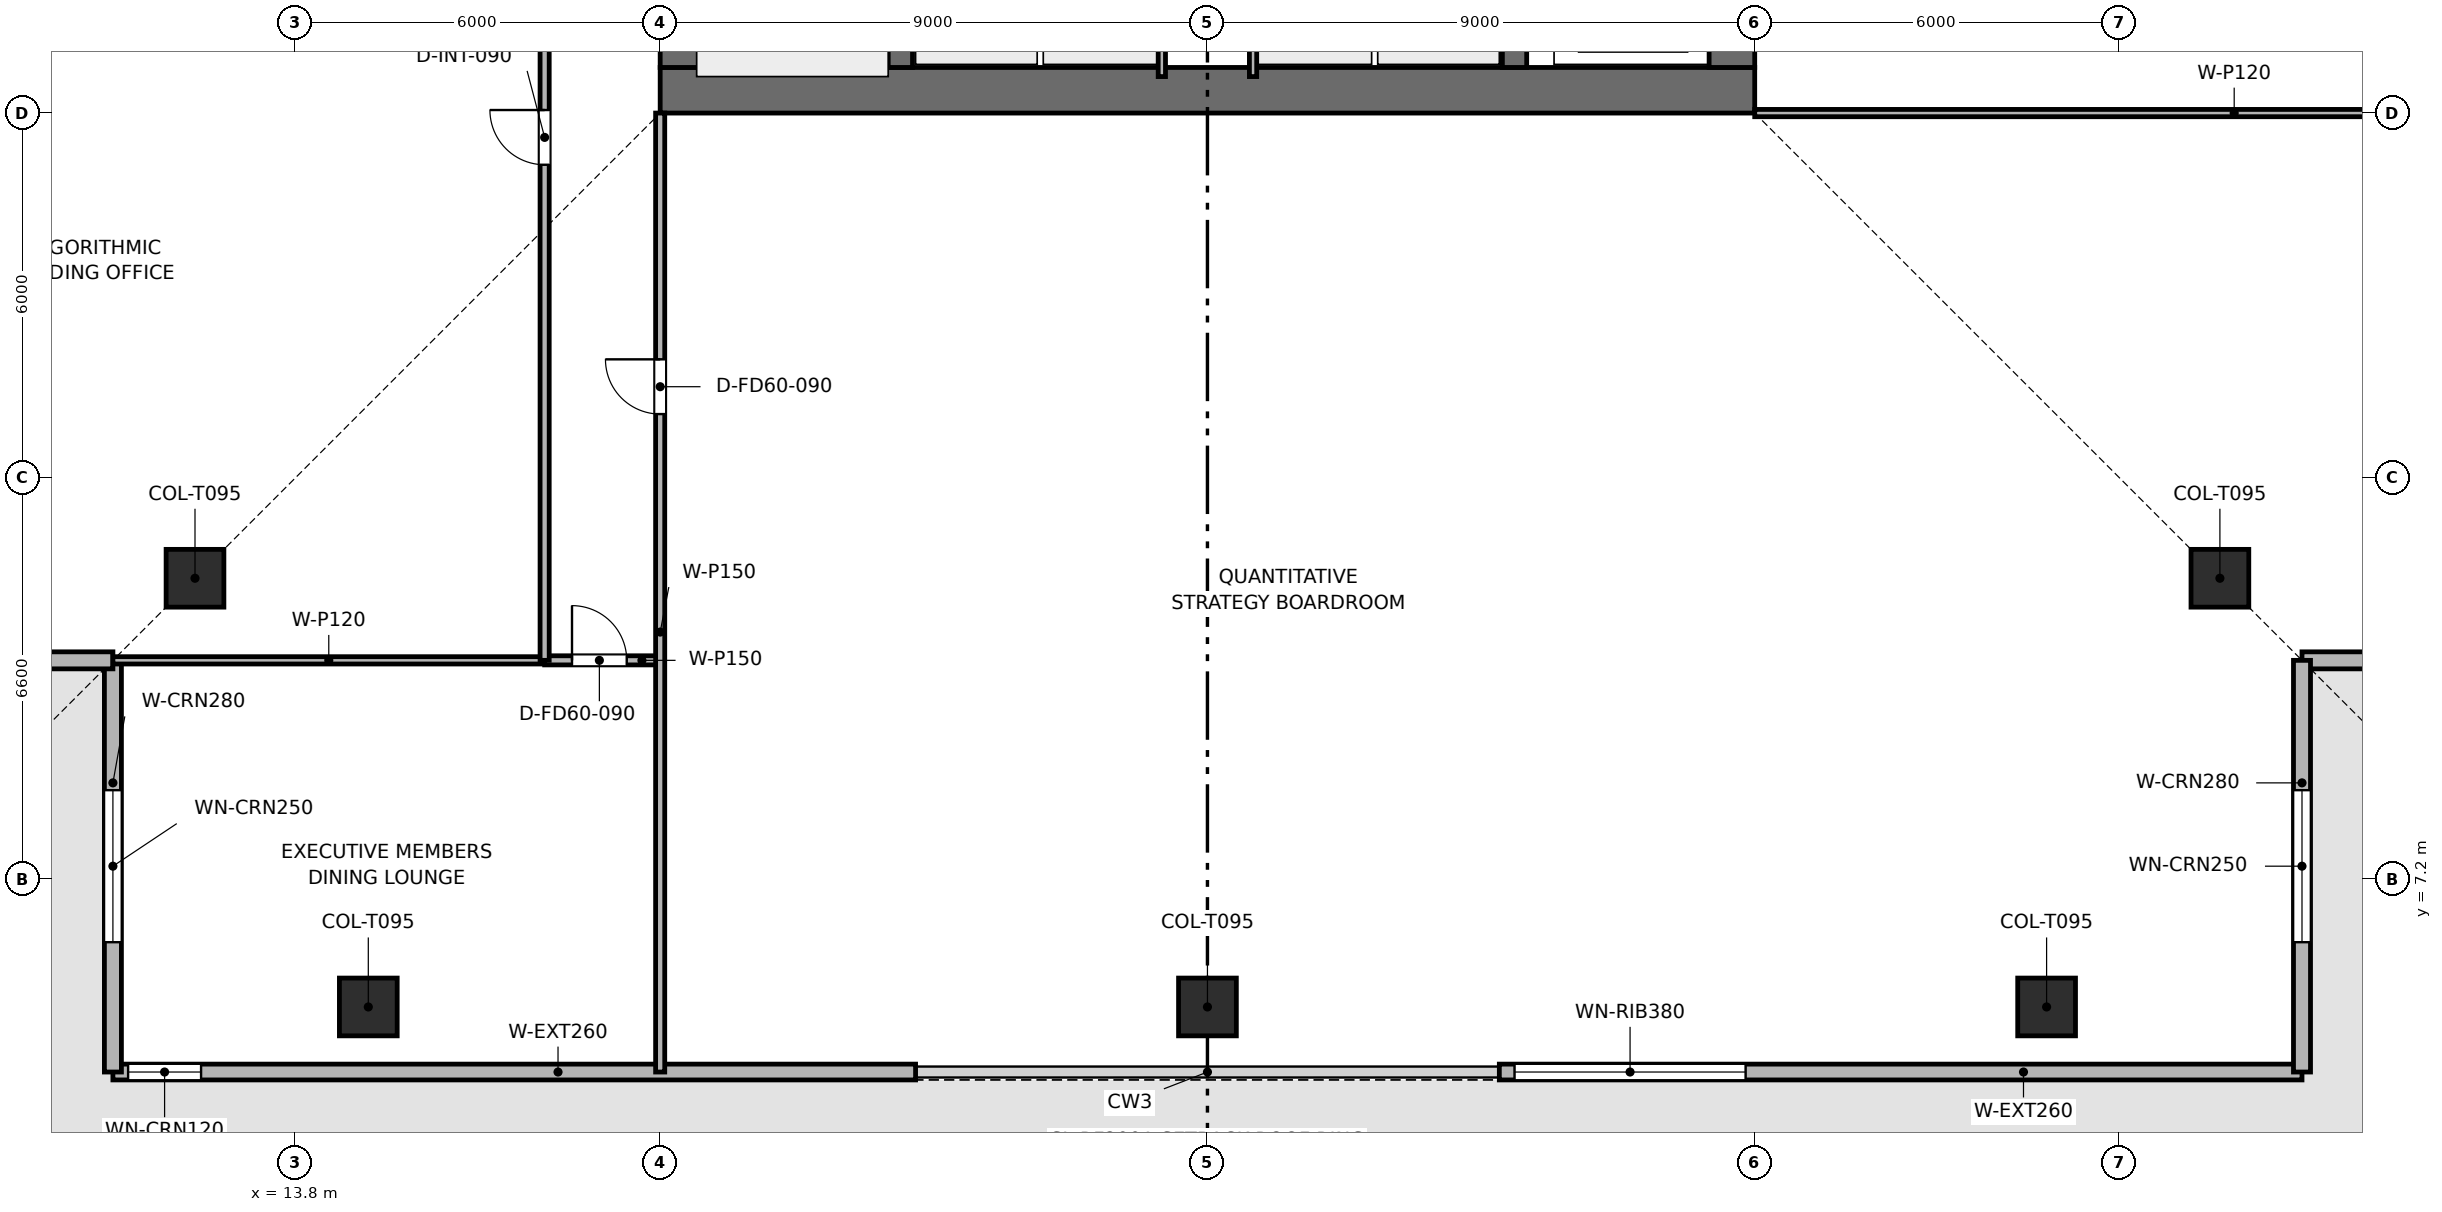
"""IFC4 building model, lengths in metres.
Left out: names, types, materials, properties, quantities, classifications, styles, units other than length and angle.
Written with IfcOpenShell. Run it as: python <this file> out.ifc"""

import sys

from ifc_helpers import new_model, si_unit, direction, frame, frame_2d, origin, origin_2d, place, context, subcontext, project, spatial, rectangle, extrude, element, fill, save


model = new_model("IFC4")
c1 = context("Model", 3, precision=1e-05, world=origin(), true_north=direction((0.0, 1.0)))
c2 = subcontext(c1, "Body", "Model", "MODEL_VIEW")
j1 = project(units=[si_unit("LENGTHUNIT", "METRE"), si_unit("PLANEANGLEUNIT", "RADIAN")], contexts=[c1])
p1 = place(None, origin())
s1 = spatial("IfcSite", under=j1, at=p1, CompositionType="ELEMENT")
p2 = place(p1, origin())
s2 = spatial("IfcBuilding", under=s1, at=p2, CompositionType="ELEMENT")
p3 = place(p2, frame((0.0, 0.0, 246.6)))
s3 = spatial("IfcBuildingStorey", under=s2, at=p3, CompositionType="ELEMENT", Elevation=246.6)
p4 = place(p3, frame((19.8, 20.175, 0.0), z_axis=(0.0, 0.0, 1.0), x_axis=(1.0, 0.0, 0.0)))
e1 = element("IfcWall", 1, at=p4, inside=s3, PredefinedType="SHEAR", context=c2, shape_type="SweptSolid", body=[
    extrude(rectangle(XDim=18.0, YDim=0.75, at=frame_2d((9.0, 0.0))), origin(), (0.0, 0.0, 1.0), 3.75),
])
p5 = place(p3, frame((20.175, 20.55, 0.0), z_axis=(0.0, 0.0, 1.0), x_axis=(0.0, 1.0, 0.0)))
e2 = element("IfcWall", 2, at=p5, inside=s3, PredefinedType="SHEAR", context=c2, shape_type="SweptSolid", body=[
    extrude(rectangle(XDim=16.5, YDim=0.75, at=frame_2d((8.25, 0.0))), origin(), (0.0, 0.0, 1.0), 3.75),
])
p6 = place(p5, frame((10.25, 0.0, 0.0)))
e3 = element("IfcOpeningElement", 3, at=p6, cuts=e2, PredefinedType="OPENING", context=c2, shape_type="SweptSolid", body=[
    extrude(rectangle(XDim=1.1, YDim=2.15, at=frame_2d((0.55, 1.075))), frame((0.0, 0.385, 0.0), z_axis=(0.0, -1.0, 0.0), x_axis=(1.0, 0.0, 0.0)), (0.0, 0.0, 1.0), 0.77),
])
p7 = place(p3, frame((37.425, 20.55, 0.0), z_axis=(0.0, 0.0, 1.0), x_axis=(0.0, 1.0, 0.0)))
e4 = element("IfcWall", 4, at=p7, inside=s3, PredefinedType="SHEAR", context=c2, shape_type="SweptSolid", body=[
    extrude(rectangle(XDim=16.5, YDim=0.75, at=frame_2d((8.25, 0.0))), origin(), (0.0, 0.0, 1.0), 3.75),
])
p8 = place(p7, frame((4.75, 0.0, 0.0)))
e5 = element("IfcOpeningElement", 5, at=p8, cuts=e4, PredefinedType="OPENING", context=c2, shape_type="SweptSolid", body=[
    extrude(rectangle(XDim=1.1, YDim=2.15, at=frame_2d((0.55, 1.075))), frame((0.0, 0.385, 0.0), z_axis=(0.0, -1.0, 0.0), x_axis=(1.0, 0.0, 0.0)), (0.0, 0.0, 1.0), 0.77),
])
for number, where, z_axis, x_axis in (
    (6, (23.75, 20.55, 0.0), (0.0, 0.0, 1.0), (0.0, 1.0, 0.0)),
    (7, (33.85, 20.55, 0.0), (0.0, 0.0, 1.0), (0.0, 1.0, 0.0)),
):
    element("IfcWall", number, at=place(p3, frame(where, z_axis=z_axis, x_axis=x_axis)), inside=s3, PredefinedType="SHEAR", context=c2, shape_type="SweptSolid", body=[
        extrude(rectangle(XDim=16.5, YDim=0.4, at=frame_2d((8.25, 0.0))), origin(), (0.0, 0.0, 1.0), 3.75),
    ])
for number, where, z_axis, x_axis in (
    (8, (15.0, 5.1, 0.003), (0.0, 0.0, 1.0), (1.0, 0.0, 0.0)),
    (9, (28.8, 5.1, 0.003), (0.0, 0.0, 1.0), (1.0, 0.0, 0.0)),
    (10, (42.6, 5.1, 0.003), (0.0, 0.0, 1.0), (1.0, 0.0, 0.0)),
    (11, (12.15, 12.15, 0.003), (0.0, 0.0, 1.0), (1.0, 0.0, 0.0)),
    (12, (45.45, 12.15, 0.003), (0.0, 0.0, 1.0), (1.0, 0.0, 0.0)),
):
    element("IfcColumn", number, at=place(p3, frame(where, z_axis=z_axis, x_axis=x_axis)), inside=s3, PredefinedType="COLUMN", context=c2, shape_type="SweptSolid", body=[
        extrude(rectangle(XDim=0.95, YDim=0.95, at=origin_2d()), origin(), (0.0, 0.0, 1.0), 3.494),
    ])
p9 = place(p3, frame((46.8, 4.03, 0.0), z_axis=(0.0, 0.0, 1.0), x_axis=(-1.0, 0.0, 0.0)))
e13 = element("IfcWall", 13, at=p9, inside=s3, PredefinedType="SOLIDWALL", context=c2, shape_type="SweptSolid", body=[
    extrude(rectangle(XDim=13.2, YDim=0.26, at=frame_2d((6.6, 0.0))), origin(), (0.0, 0.0, 1.0), 3.5),
])
p10 = place(p9, frame((9.15, 0.0, 0.9)))
e14 = element("IfcOpeningElement", 14, at=p10, cuts=e13, PredefinedType="OPENING", context=c2, shape_type="SweptSolid", body=[
    extrude(rectangle(XDim=3.8, YDim=1.9, at=frame_2d((1.9, 0.95))), frame((0.0, 0.14, 0.0), z_axis=(0.0, -1.0, 0.0), x_axis=(1.0, 0.0, 0.0)), (0.0, 0.0, 1.0), 0.28),
])
p11 = place(p3, frame((24.0, 4.03, 0.0), z_axis=(0.0, 0.0, 1.0), x_axis=(-1.0, 0.0, 0.0)))
e15 = element("IfcWall", 15, at=p11, inside=s3, PredefinedType="SOLIDWALL", context=c2, shape_type="SweptSolid", body=[
    extrude(rectangle(XDim=13.2, YDim=0.26, at=frame_2d((6.6, 0.0))), origin(), (0.0, 0.0, 1.0), 3.5),
])
p12 = place(p11, frame((11.75, 0.0, 0.9)))
e16 = element("IfcOpeningElement", 16, at=p12, cuts=e15, PredefinedType="OPENING", context=c2, shape_type="SweptSolid", body=[
    extrude(rectangle(XDim=1.2, YDim=2.1, at=frame_2d((0.6, 1.05))), frame((0.0, 0.14, 0.0), z_axis=(0.0, -1.0, 0.0), x_axis=(1.0, 0.0, 0.0)), (0.0, 0.0, 1.0), 0.28),
])
p13 = place(p3, frame((10.8, 4.03, 0.0), z_axis=(0.0, 0.0, 1.0), x_axis=(0.0, 1.0, 0.0)))
e17 = element("IfcWall", 17, at=p13, inside=s3, PredefinedType="SOLIDWALL", context=c2, shape_type="SweptSolid", body=[
    extrude(rectangle(XDim=6.77, YDim=0.28, at=frame_2d((3.385, 0.0))), origin(), (0.0, 0.0, 1.0), 3.5),
])
p14 = place(p13, frame((2.135, 0.0, 0.9)))
e18 = element("IfcOpeningElement", 18, at=p14, cuts=e17, PredefinedType="OPENING", context=c2, shape_type="SweptSolid", body=[
    extrude(rectangle(XDim=2.5, YDim=1.9, at=frame_2d((1.25, 0.95))), frame((0.0, 0.15, 0.0), z_axis=(0.0, -1.0, 0.0), x_axis=(1.0, 0.0, 0.0)), (0.0, 0.0, 1.0), 0.3),
])
p15 = place(p3, frame((10.8, 10.8, 0.0), z_axis=(0.0, 0.0, 1.0), x_axis=(-1.0, 0.0, 0.0)))
e19 = element("IfcWall", 19, at=p15, inside=s3, PredefinedType="SOLIDWALL", context=c2, shape_type="SweptSolid", body=[
    extrude(rectangle(XDim=6.77, YDim=0.28, at=frame_2d((3.385, 0.0))), origin(), (0.0, 0.0, 1.0), 3.5),
])
p16 = place(p15, frame((2.135, 0.0, 0.9)))
e20 = element("IfcOpeningElement", 20, at=p16, cuts=e19, PredefinedType="OPENING", context=c2, shape_type="SweptSolid", body=[
    extrude(rectangle(XDim=2.5, YDim=1.9, at=frame_2d((1.25, 0.95))), frame((0.0, 0.15, 0.0), z_axis=(0.0, -1.0, 0.0), x_axis=(1.0, 0.0, 0.0)), (0.0, 0.0, 1.0), 0.3),
])
p17 = place(p3, frame((53.57, 10.8, 0.0), z_axis=(0.0, 0.0, 1.0), x_axis=(-1.0, 0.0, 0.0)))
e21 = element("IfcWall", 21, at=p17, inside=s3, PredefinedType="SOLIDWALL", context=c2, shape_type="SweptSolid", body=[
    extrude(rectangle(XDim=6.77, YDim=0.28, at=frame_2d((3.385, 0.0))), origin(), (0.0, 0.0, 1.0), 3.5),
])
p18 = place(p17, frame((2.135, 0.0, 0.9)))
e22 = element("IfcOpeningElement", 22, at=p18, cuts=e21, PredefinedType="OPENING", context=c2, shape_type="SweptSolid", body=[
    extrude(rectangle(XDim=2.5, YDim=1.9, at=frame_2d((1.25, 0.95))), frame((0.0, 0.15, 0.0), z_axis=(0.0, -1.0, 0.0), x_axis=(1.0, 0.0, 0.0)), (0.0, 0.0, 1.0), 0.3),
])
p19 = place(p3, frame((46.8, 10.8, 0.0), z_axis=(0.0, 0.0, 1.0), x_axis=(0.0, -1.0, 0.0)))
e23 = element("IfcWall", 23, at=p19, inside=s3, PredefinedType="SOLIDWALL", context=c2, shape_type="SweptSolid", body=[
    extrude(rectangle(XDim=6.77, YDim=0.28, at=frame_2d((3.385, 0.0))), origin(), (0.0, 0.0, 1.0), 3.5),
])
p20 = place(p19, frame((2.135, 0.0, 0.9)))
e24 = element("IfcOpeningElement", 24, at=p20, cuts=e23, PredefinedType="OPENING", context=c2, shape_type="SweptSolid", body=[
    extrude(rectangle(XDim=2.5, YDim=1.9, at=frame_2d((1.25, 0.95))), frame((0.0, 0.15, 0.0), z_axis=(0.0, -1.0, 0.0), x_axis=(1.0, 0.0, 0.0)), (0.0, 0.0, 1.0), 0.3),
])
for number, where, z_axis, x_axis in (
    (25, (28.05, 20.4, 0.0), (0.0, 0.0, 1.0), (0.0, 1.0, 0.0)),
    (26, (29.55, 20.4, 0.0), (0.0, 0.0, 1.0), (0.0, 1.0, 0.0)),
):
    element("IfcWall", number, at=place(p3, frame(where, z_axis=z_axis, x_axis=x_axis)), inside=s3, PredefinedType="PARTITIONING", context=c2, shape_type="SweptSolid", body=[
        extrude(rectangle(XDim=2.75, YDim=0.12, at=frame_2d((1.375, 0.0))), origin(), (0.0, 0.0, 1.0), 3.5),
    ])
p21 = place(p3, frame((10.8, 10.8, 0.0), z_axis=(0.0, 0.0, 1.0), x_axis=(1.0, 0.0, 0.0)))
e27 = element("IfcWall", 27, at=p21, inside=s3, PredefinedType="PARTITIONING", context=c2, shape_type="SweptSolid", body=[
    extrude(rectangle(XDim=7.1, YDim=0.12, at=frame_2d((3.55, 0.0))), origin(), (0.0, 0.0, 1.0), 3.085),
])
p22 = place(p3, frame((17.9, 10.8, 0.0), z_axis=(0.0, 0.0, 1.0), x_axis=(1.0, 0.0, 0.0)))
e28 = element("IfcWall", 28, at=p22, inside=s3, PredefinedType="PARTITIONING", context=c2, shape_type="SweptSolid", body=[
    extrude(rectangle(XDim=1.9, YDim=0.15, at=frame_2d((0.95, 0.0))), origin(), (0.0, 0.0, 1.0), 3.5),
])
p23 = place(p22, frame((0.45, 0.0, 0.0)))
e29 = element("IfcOpeningElement", 29, at=p23, cuts=e28, PredefinedType="OPENING", context=c2, shape_type="SweptSolid", body=[
    extrude(rectangle(XDim=0.9, YDim=2.1, at=frame_2d((0.45, 1.05))), frame((0.0, 0.085, 0.0), z_axis=(0.0, -1.0, 0.0), x_axis=(1.0, 0.0, 0.0)), (0.0, 0.0, 1.0), 0.17),
])
p24 = place(p3, frame((19.8, 4.03, 0.0), z_axis=(0.0, 0.0, 1.0), x_axis=(0.0, 1.0, 0.0)))
e30 = element("IfcWall", 30, at=p24, inside=s3, PredefinedType="PARTITIONING", context=c2, shape_type="SweptSolid", body=[
    extrude(rectangle(XDim=15.77, YDim=0.15, at=frame_2d((7.885, 0.0))), origin(), (0.0, 0.0, 1.0), 3.085),
])
p25 = place(p24, frame((10.82, 0.0, 0.0)))
e31 = element("IfcOpeningElement", 31, at=p25, cuts=e30, PredefinedType="OPENING", context=c2, shape_type="SweptSolid", body=[
    extrude(rectangle(XDim=0.9, YDim=2.1, at=frame_2d((0.45, 1.05))), frame((0.0, 0.085, 0.0), z_axis=(0.0, -1.0, 0.0), x_axis=(1.0, 0.0, 0.0)), (0.0, 0.0, 1.0), 0.17),
])
p26 = place(p3, frame((37.8, 19.8, 0.0), z_axis=(0.0, 0.0, 1.0), x_axis=(1.0, 0.0, 0.0)))
e32 = element("IfcWall", 32, at=p26, inside=s3, PredefinedType="PARTITIONING", context=c2, shape_type="SweptSolid", body=[
    extrude(rectangle(XDim=15.77, YDim=0.12, at=frame_2d((7.885, 0.0))), origin(), (0.0, 0.0, 1.0), 3.085),
])
p27 = place(p3, frame((17.9, 10.8, 0.0), z_axis=(0.0, 0.0, 1.0), x_axis=(0.0, 1.0, 0.0)))
e33 = element("IfcWall", 33, at=p27, inside=s3, PredefinedType="PARTITIONING", context=c2, shape_type="SweptSolid", body=[
    extrude(rectangle(XDim=28.9, YDim=0.15, at=frame_2d((14.45, 0.0))), origin(), (0.0, 0.0, 1.0), 3.085),
])
p28 = place(p27, frame((8.15, 0.0, 0.0)))
e34 = element("IfcOpeningElement", 34, at=p28, cuts=e33, PredefinedType="OPENING", context=c2, shape_type="SweptSolid", body=[
    extrude(rectangle(XDim=0.9, YDim=2.1, at=frame_2d((0.45, 1.05))), frame((0.0, 0.085, 0.0), z_axis=(0.0, -1.0, 0.0), x_axis=(1.0, 0.0, 0.0)), (0.0, 0.0, 1.0), 0.17),
])
p29 = place(p27, frame((18.15, 0.0, 0.0)))
e35 = element("IfcOpeningElement", 35, at=p29, cuts=e33, PredefinedType="OPENING", context=c2, shape_type="SweptSolid", body=[
    extrude(rectangle(XDim=0.9, YDim=2.1, at=frame_2d((0.45, 1.05))), frame((0.0, 0.085, 0.0), z_axis=(0.0, -1.0, 0.0), x_axis=(1.0, 0.0, 0.0)), (0.0, 0.0, 1.0), 0.17),
])
p30 = place(p27, frame((21.05, 0.0, 0.0)))
e36 = element("IfcOpeningElement", 36, at=p30, cuts=e33, PredefinedType="OPENING", context=c2, shape_type="SweptSolid", body=[
    extrude(rectangle(XDim=0.9, YDim=2.1, at=frame_2d((0.45, 1.05))), frame((0.0, 0.085, 0.0), z_axis=(0.0, -1.0, 0.0), x_axis=(1.0, 0.0, 0.0)), (0.0, 0.0, 1.0), 0.17),
])
p31 = place(p27, frame((23.8, 0.0, 0.0)))
e37 = element("IfcOpeningElement", 37, at=p31, cuts=e33, PredefinedType="OPENING", context=c2, shape_type="SweptSolid", body=[
    extrude(rectangle(XDim=0.95, YDim=2.1, at=frame_2d((0.475, 1.05))), frame((0.0, 0.085, 0.0), z_axis=(0.0, -1.0, 0.0), x_axis=(1.0, 0.0, 0.0)), (0.0, 0.0, 1.0), 0.17),
])
p32 = place(p27, frame((26.8, 0.0, 0.0)))
e38 = element("IfcOpeningElement", 38, at=p32, cuts=e33, PredefinedType="OPENING", context=c2, shape_type="SweptSolid", body=[
    extrude(rectangle(XDim=0.9, YDim=2.1, at=frame_2d((0.45, 1.05))), frame((0.0, 0.085, 0.0), z_axis=(0.0, -1.0, 0.0), x_axis=(1.0, 0.0, 0.0)), (0.0, 0.0, 1.0), 0.17),
])
p33 = place(p10, origin())
e39 = element("IfcWindow", 39, at=p33, inside=s3, PartitioningType="SINGLE_PANEL", PredefinedType="WINDOW", context=c2, shape_type="SweptSolid", body=[
    extrude(rectangle(XDim=3.8, YDim=1.9, at=frame_2d((1.9, 0.95))), frame((0.0, 0.03, 0.0), z_axis=(0.0, -1.0, 0.0), x_axis=(1.0, 0.0, 0.0)), (0.0, 0.0, 1.0), 0.06),
])
fill(e14, e39)
p34 = place(p12, origin())
e40 = element("IfcWindow", 40, at=p34, inside=s3, PartitioningType="SINGLE_PANEL", PredefinedType="WINDOW", context=c2, shape_type="SweptSolid", body=[
    extrude(rectangle(XDim=1.2, YDim=2.1, at=frame_2d((0.6, 1.05))), frame((0.0, 0.03, 0.0), z_axis=(0.0, -1.0, 0.0), x_axis=(1.0, 0.0, 0.0)), (0.0, 0.0, 1.0), 0.06),
])
fill(e16, e40)
p35 = place(p14, origin())
e41 = element("IfcWindow", 41, at=p35, inside=s3, PartitioningType="SINGLE_PANEL", PredefinedType="WINDOW", context=c2, shape_type="SweptSolid", body=[
    extrude(rectangle(XDim=2.5, YDim=1.9, at=frame_2d((1.25, 0.95))), frame((0.0, 0.03, 0.0), z_axis=(0.0, -1.0, 0.0), x_axis=(1.0, 0.0, 0.0)), (0.0, 0.0, 1.0), 0.06),
])
fill(e18, e41)
p36 = place(p20, origin())
e42 = element("IfcWindow", 42, at=p36, inside=s3, PartitioningType="SINGLE_PANEL", PredefinedType="WINDOW", context=c2, shape_type="SweptSolid", body=[
    extrude(rectangle(XDim=2.5, YDim=1.9, at=frame_2d((1.25, 0.95))), frame((0.0, 0.03, 0.0), z_axis=(0.0, -1.0, 0.0), x_axis=(1.0, 0.0, 0.0)), (0.0, 0.0, 1.0), 0.06),
])
fill(e24, e42)
p37 = place(p23, origin())
e43 = element("IfcDoor", 43, at=p37, inside=s3, OperationType="SINGLE_SWING_LEFT", PredefinedType="DOOR", context=c2, shape_type="SweptSolid", body=[
    extrude(rectangle(XDim=0.9, YDim=2.1, at=frame_2d((0.45, 1.05))), frame((0.0, 0.025, 0.0), z_axis=(0.0, -1.0, 0.0), x_axis=(1.0, 0.0, 0.0)), (0.0, 0.0, 1.0), 0.05),
])
fill(e29, e43)
p38 = place(p25, origin())
e44 = element("IfcDoor", 44, at=p38, inside=s3, OperationType="SINGLE_SWING_RIGHT", PredefinedType="DOOR", context=c2, shape_type="SweptSolid", body=[
    extrude(rectangle(XDim=0.9, YDim=2.1, at=frame_2d((0.45, 1.05))), frame((0.0, 0.025, 0.0), z_axis=(0.0, -1.0, 0.0), x_axis=(1.0, 0.0, 0.0)), (0.0, 0.0, 1.0), 0.05),
])
fill(e31, e44)
p39 = place(p28, origin())
e45 = element("IfcDoor", 45, at=p39, inside=s3, OperationType="SINGLE_SWING_RIGHT", PredefinedType="DOOR", context=c2, shape_type="SweptSolid", body=[
    extrude(rectangle(XDim=0.9, YDim=2.1, at=frame_2d((0.45, 1.05))), frame((0.0, 0.025, 0.0), z_axis=(0.0, -1.0, 0.0), x_axis=(1.0, 0.0, 0.0)), (0.0, 0.0, 1.0), 0.05),
])
fill(e34, e45)
save(model, sys.argv[1])
